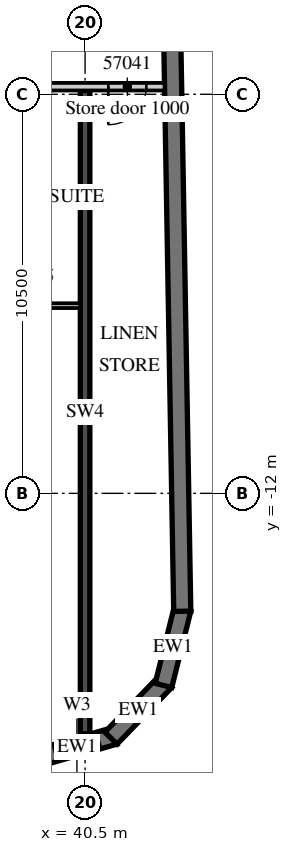
"""IFC4 building model, lengths in metres.
Left out: names, types, materials, properties, quantities, classifications, styles, units other than length and angle.
Written with IfcOpenShell. Run it as: python <this file> out.ifc"""

import sys

from ifc_helpers import new_model, si_unit, direction, frame, frame_2d, origin, place, context, subcontext, project, spatial, polyline, rectangle, outline, extrude, element, fill, save


model = new_model("IFC4")
c1 = context("Model", 3, precision=1e-05, world=origin(), true_north=direction((0.0, 1.0)))
c2 = subcontext(c1, "Body", "Model", "MODEL_VIEW")
j1 = project(units=[si_unit("LENGTHUNIT", "METRE"), si_unit("PLANEANGLEUNIT", "RADIAN")], contexts=[c1])
p1 = place(None, origin())
s1 = spatial("IfcSite", under=j1, at=p1, CompositionType="ELEMENT")
p2 = place(p1, origin())
s2 = spatial("IfcBuilding", under=s1, at=p2, CompositionType="ELEMENT")
p3 = place(p2, frame((0.0, 0.0, 234.2)))
s3 = spatial("IfcBuildingStorey", under=s2, at=p3, CompositionType="ELEMENT", Elevation=234.2)
p4 = place(p3, frame((40.5, -18.325, 0.0), z_axis=(0.0, 0.0, 1.0), x_axis=(0.0, 1.0, 0.0)))
e1 = element("IfcWall", 1, at=p4, inside=s3, PredefinedType="SHEAR", context=c2, shape_type="SweptSolid", body=[
    extrude(rectangle(XDim=16.925, YDim=0.25, at=frame_2d((8.463, 0.0))), origin(), (0.0, 0.0, 1.0), 3.3),
])
p5 = place(p3, frame((39.29, -18.952, 0.0), z_axis=(0.0, 0.0, 1.0), x_axis=(0.961247584925, 0.275686562016, 0.0)))
e2 = element("IfcWall", 2, at=p5, inside=s3, PredefinedType="SOLIDWALL", context=c2, shape_type="SweptSolid", body=[
    extrude(outline(polyline([(0.0, -0.225), (2.071, -0.225), (1.95, 0.225), (0.121, 0.225), (0.0, -0.225)])), origin(), (0.0, 0.0, 1.0), 3.02),
])
p6 = place(p5, frame((0.435, 0.0, 0.45)))
e3 = element("IfcOpeningElement", 3, at=p6, cuts=e2, PredefinedType="OPENING", context=c2, shape_type="SweptSolid", body=[
    extrude(rectangle(XDim=1.2, YDim=2.25, at=frame_2d((0.6, 1.125))), frame((0.0, 0.235, 0.0), z_axis=(0.0, -1.0, 0.0), x_axis=(1.0, 0.0, 0.0)), (0.0, 0.0, 1.0), 0.47),
])
p7 = place(p3, frame((41.181, -18.442, 0.0), z_axis=(0.0, 0.0, 1.0), x_axis=(0.694678672846, 0.719320193998, 0.0)))
e4 = element("IfcWall", 4, at=p7, inside=s3, PredefinedType="SOLIDWALL", context=c2, shape_type="SweptSolid", body=[
    extrude(outline(polyline([(0.0, -0.225), (2.071, -0.225), (1.95, 0.225), (0.121, 0.225), (0.0, -0.225)])), origin(), (0.0, 0.0, 1.0), 3.02),
])
p8 = place(p3, frame((42.563, -17.054, 0.0), z_axis=(0.0, 0.0, 1.0), x_axis=(0.241841950319, 0.970315655375, 0.0)))
e5 = element("IfcWall", 5, at=p8, inside=s3, PredefinedType="SOLIDWALL", context=c2, shape_type="SweptSolid", body=[
    extrude(outline(polyline([(0.0, -0.225), (2.071, -0.225), (1.95, 0.225), (0.121, 0.225), (0.0, -0.225)])), origin(), (0.0, 0.0, 1.0), 3.02),
])
p9 = place(p3, frame((43.057, -15.103, 0.0), z_axis=(0.0, 0.0, 1.0), x_axis=(-0.017452408953, 0.999847695112, 0.0)))
e6 = element("IfcWall", 6, at=p9, inside=s3, PredefinedType="SOLIDWALL", context=c2, shape_type="SweptSolid", body=[
    extrude(rectangle(XDim=33.0, YDim=0.45, at=frame_2d((16.5, 0.0))), origin(), (0.0, 0.0, 1.0), 3.02),
])
p10 = place(p3, frame((13.5, -1.3, 0.0), z_axis=(0.0, 0.0, 1.0), x_axis=(1.0, 0.0, 0.0)))
e7 = element("IfcWall", 7, at=p10, inside=s3, PredefinedType="PARTITIONING", context=c2, shape_type="SweptSolid", body=[
    extrude(rectangle(XDim=29.091, YDim=0.2, at=frame_2d((14.545, 0.0))), origin(), (0.0, 0.0, 1.0), 3.02),
])
p11 = place(p10, frame((0.575, 0.0, 0.0)))
e8 = element("IfcOpeningElement", 8, at=p11, cuts=e7, PredefinedType="OPENING", context=c2, shape_type="SweptSolid", body=[
    extrude(rectangle(XDim=1.0, YDim=2.1, at=frame_2d((0.5, 1.05))), frame((0.0, 0.11, 0.0), z_axis=(0.0, -1.0, 0.0), x_axis=(1.0, 0.0, 0.0)), (0.0, 0.0, 1.0), 0.22),
])
p12 = place(p10, frame((5.075, 0.0, 0.0)))
e9 = element("IfcOpeningElement", 9, at=p12, cuts=e7, PredefinedType="OPENING", context=c2, shape_type="SweptSolid", body=[
    extrude(rectangle(XDim=1.0, YDim=2.1, at=frame_2d((0.5, 1.05))), frame((0.0, 0.11, 0.0), z_axis=(0.0, -1.0, 0.0), x_axis=(1.0, 0.0, 0.0)), (0.0, 0.0, 1.0), 0.22),
])
p13 = place(p10, frame((9.55, 0.0, 0.0)))
e10 = element("IfcOpeningElement", 10, at=p13, cuts=e7, PredefinedType="OPENING", context=c2, shape_type="SweptSolid", body=[
    extrude(rectangle(XDim=1.0, YDim=2.1, at=frame_2d((0.5, 1.05))), frame((0.0, 0.11, 0.0), z_axis=(0.0, -1.0, 0.0), x_axis=(1.0, 0.0, 0.0)), (0.0, 0.0, 1.0), 0.22),
])
p14 = place(p10, frame((18.862, 0.0, 0.0)))
e11 = element("IfcOpeningElement", 11, at=p14, cuts=e7, PredefinedType="OPENING", context=c2, shape_type="SweptSolid", body=[
    extrude(rectangle(XDim=1.2, YDim=2.1, at=frame_2d((0.6, 1.05))), frame((0.0, 0.11, 0.0), z_axis=(0.0, -1.0, 0.0), x_axis=(1.0, 0.0, 0.0)), (0.0, 0.0, 1.0), 0.22),
])
p15 = place(p10, frame((23.075, 0.0, 0.0)))
e12 = element("IfcOpeningElement", 12, at=p15, cuts=e7, PredefinedType="OPENING", context=c2, shape_type="SweptSolid", body=[
    extrude(rectangle(XDim=1.0, YDim=2.1, at=frame_2d((0.5, 1.05))), frame((0.0, 0.11, 0.0), z_axis=(0.0, -1.0, 0.0), x_axis=(1.0, 0.0, 0.0)), (0.0, 0.0, 1.0), 0.22),
])
p16 = place(p10, frame((27.611, 0.0, 0.0)))
e13 = element("IfcOpeningElement", 13, at=p16, cuts=e7, PredefinedType="OPENING", context=c2, shape_type="SweptSolid", body=[
    extrude(rectangle(XDim=1.0, YDim=2.4, at=frame_2d((0.5, 1.2))), frame((0.0, 0.11, 0.0), z_axis=(0.0, -1.0, 0.0), x_axis=(1.0, 0.0, 0.0)), (0.0, 0.0, 1.0), 0.22),
])
p17 = place(p3, frame((38.15, -7.062, 0.0), z_axis=(0.0, 0.0, 1.0), x_axis=(1.0, 0.0, 0.0)))
e14 = element("IfcWall", 14, at=p17, inside=s3, PredefinedType="PARTITIONING", context=c2, shape_type="SweptSolid", body=[
    extrude(rectangle(XDim=2.225, YDim=0.125, at=frame_2d((1.113, 0.0))), origin(), (0.0, 0.0, 1.0), 3.02),
])
p18 = place(p6, origin())
e15 = element("IfcWindow", 15, at=p18, inside=s3, PartitioningType="SINGLE_PANEL", PredefinedType="WINDOW", context=c2, shape_type="SweptSolid", body=[
    extrude(rectangle(XDim=1.2, YDim=2.25, at=frame_2d((0.6, 1.125))), frame((0.0, 0.09, 0.0), z_axis=(0.0, -1.0, 0.0), x_axis=(1.0, 0.0, 0.0)), (0.0, 0.0, 1.0), 0.06),
])
fill(e3, e15)
p19 = place(p16, origin())
e16 = element("IfcDoor", 16, at=p19, inside=s3, OperationType="SINGLE_SWING_LEFT", PredefinedType="DOOR", context=c2, shape_type="SweptSolid", body=[
    extrude(rectangle(XDim=1.0, YDim=2.4, at=frame_2d((0.5, 1.2))), frame((0.0, 0.025, 0.0), z_axis=(0.0, -1.0, 0.0), x_axis=(1.0, 0.0, 0.0)), (0.0, 0.0, 1.0), 0.05),
])
fill(e13, e16)
save(model, sys.argv[1])
